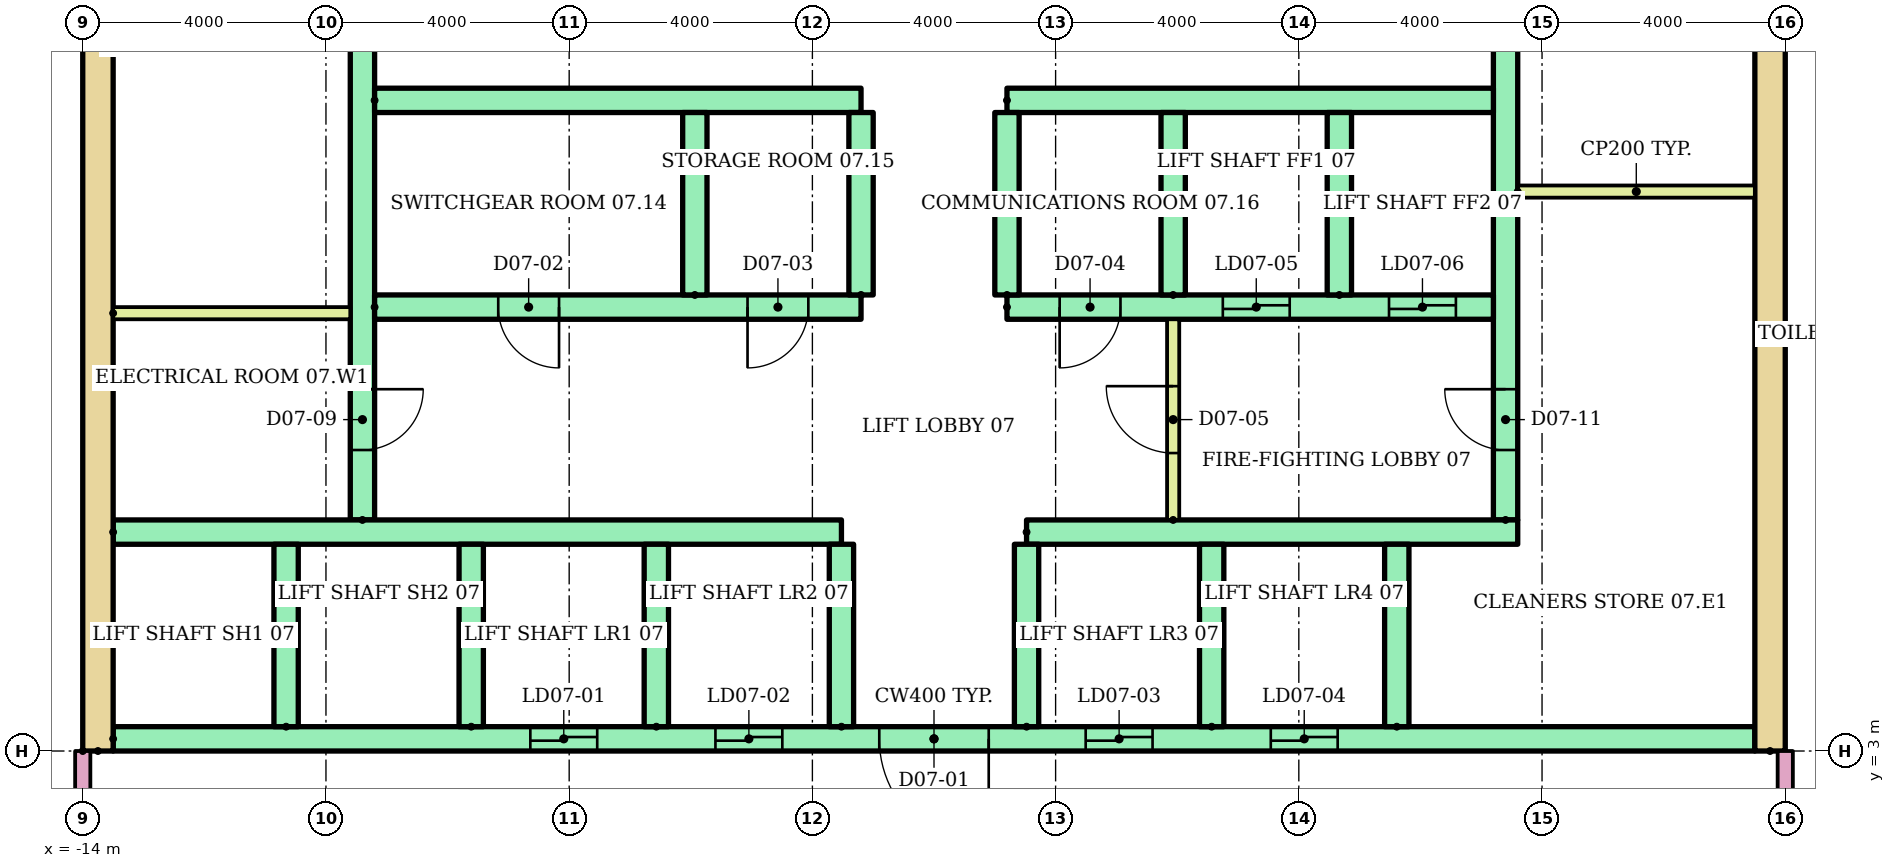
"""IFC4 building model, lengths in metres.
Left out: names, types, materials, properties, quantities, classifications, styles, units other than length and angle.
Written with IfcOpenShell. Run it as: python <this file> out.ifc"""

import sys

from ifc_helpers import new_model, si_unit, direction, frame, frame_2d, origin, place, context, subcontext, project, spatial, rectangle, extrude, element, fill, save


model = new_model("IFC4")
c1 = context("Model", 3, precision=1e-05, world=origin(), true_north=direction((0.0, 1.0)))
c2 = subcontext(c1, "Body", "Model", "MODEL_VIEW")
j1 = project(units=[si_unit("LENGTHUNIT", "METRE"), si_unit("PLANEANGLEUNIT", "RADIAN")], contexts=[c1])
p1 = place(None, origin())
s1 = spatial("IfcSite", under=j1, at=p1, CompositionType="ELEMENT")
p2 = place(p1, origin())
s2 = spatial("IfcBuilding", under=s1, at=p2, CompositionType="ELEMENT")
p3 = place(p2, frame((0.0, 0.0, 29.9)))
s3 = spatial("IfcBuildingStorey", under=s2, at=p3, CompositionType="ELEMENT", Elevation=29.9)
for number, where, z_axis, x_axis in (
    (1, (-13.75, 3.0, 0.0), (0.0, 0.0, 1.0), (0.0, 1.0, 0.0)),
    (2, (13.75, 3.0, 0.0), (0.0, 0.0, 1.0), (0.0, 1.0, 0.0)),
):
    element("IfcWall", number, at=place(p3, frame(where, z_axis=z_axis, x_axis=x_axis)), inside=s3, PredefinedType="SHEAR", context=c2, shape_type="SweptSolid", body=[
        extrude(rectangle(XDim=17.0, YDim=0.5, at=frame_2d((8.5, 0.0))), origin(), (0.0, 0.0, 1.0), 3.6),
    ])
p4 = place(p3, frame((-9.4, 6.8, 0.0), z_axis=(0.0, 0.0, 1.0), x_axis=(0.0, 1.0, 0.0)))
e3 = element("IfcWall", 3, at=p4, inside=s3, PredefinedType="SHEAR", context=c2, shape_type="SweptSolid", body=[
    extrude(rectangle(XDim=12.7, YDim=0.4, at=frame_2d((6.35, 0.0))), origin(), (0.0, 0.0, 1.0), 3.6),
])
p5 = place(p4, frame((1.15, 0.0, 0.0)))
e4 = element("IfcOpeningElement", 4, at=p5, cuts=e3, PredefinedType="OPENING", context=c2, shape_type="SweptSolid", body=[
    extrude(rectangle(XDim=1.0, YDim=2.1, at=frame_2d((0.5, 1.05))), frame((0.0, 0.21, 0.0), z_axis=(0.0, -1.0, 0.0), x_axis=(1.0, 0.0, 0.0)), (0.0, 0.0, 1.0), 0.42),
])
p6 = place(p4, frame((7.925, 0.0, 0.0)))
e5 = element("IfcOpeningElement", 5, at=p6, cuts=e3, PredefinedType="OPENING", context=c2, shape_type="SweptSolid", body=[
    extrude(rectangle(XDim=1.0, YDim=2.1, at=frame_2d((0.5, 1.05))), frame((0.0, 0.21, 0.0), z_axis=(0.0, -1.0, 0.0), x_axis=(1.0, 0.0, 0.0)), (0.0, 0.0, 1.0), 0.42),
])
p7 = place(p3, frame((9.4, 6.8, 0.0), z_axis=(0.0, 0.0, 1.0), x_axis=(0.0, 1.0, 0.0)))
e6 = element("IfcWall", 6, at=p7, inside=s3, PredefinedType="SHEAR", context=c2, shape_type="SweptSolid", body=[
    extrude(rectangle(XDim=12.7, YDim=0.4, at=frame_2d((6.35, 0.0))), origin(), (0.0, 0.0, 1.0), 3.6),
])
p8 = place(p7, frame((1.15, 0.0, 0.0)))
e7 = element("IfcOpeningElement", 7, at=p8, cuts=e6, PredefinedType="OPENING", context=c2, shape_type="SweptSolid", body=[
    extrude(rectangle(XDim=1.0, YDim=2.1, at=frame_2d((0.5, 1.05))), frame((0.0, 0.21, 0.0), z_axis=(0.0, -1.0, 0.0), x_axis=(1.0, 0.0, 0.0)), (0.0, 0.0, 1.0), 0.42),
])
p9 = place(p7, frame((7.925, 0.0, 0.0)))
e8 = element("IfcOpeningElement", 8, at=p9, cuts=e6, PredefinedType="OPENING", context=c2, shape_type="SweptSolid", body=[
    extrude(rectangle(XDim=1.0, YDim=2.1, at=frame_2d((0.5, 1.05))), frame((0.0, 0.21, 0.0), z_axis=(0.0, -1.0, 0.0), x_axis=(1.0, 0.0, 0.0)), (0.0, 0.0, 1.0), 0.42),
])
p10 = place(p3, frame((-13.5, 3.2, 0.0)))
e9 = element("IfcWall", 9, at=p10, inside=s3, PredefinedType="SHEAR", context=c2, shape_type="SweptSolid", body=[
    extrude(rectangle(XDim=27.0, YDim=0.4, at=frame_2d((13.5, 0.0))), origin(), (0.0, 0.0, 1.0), 3.6),
])
p11 = place(p10, frame((6.861, 0.0, 0.0)))
e10 = element("IfcOpeningElement", 10, at=p11, cuts=e9, PredefinedType="OPENING", context=c2, shape_type="SweptSolid", body=[
    extrude(rectangle(XDim=1.1, YDim=2.1, at=frame_2d((0.55, 1.05))), frame((0.0, 0.21, 0.0), z_axis=(0.0, -1.0, 0.0), x_axis=(1.0, 0.0, 0.0)), (0.0, 0.0, 1.0), 0.42),
])
p12 = place(p10, frame((9.906, 0.0, 0.0)))
e11 = element("IfcOpeningElement", 11, at=p12, cuts=e9, PredefinedType="OPENING", context=c2, shape_type="SweptSolid", body=[
    extrude(rectangle(XDim=1.1, YDim=2.1, at=frame_2d((0.55, 1.05))), frame((0.0, 0.21, 0.0), z_axis=(0.0, -1.0, 0.0), x_axis=(1.0, 0.0, 0.0)), (0.0, 0.0, 1.0), 0.42),
])
p13 = place(p10, frame((15.994, 0.0, 0.0)))
e12 = element("IfcOpeningElement", 12, at=p13, cuts=e9, PredefinedType="OPENING", context=c2, shape_type="SweptSolid", body=[
    extrude(rectangle(XDim=1.1, YDim=2.1, at=frame_2d((0.55, 1.05))), frame((0.0, 0.21, 0.0), z_axis=(0.0, -1.0, 0.0), x_axis=(1.0, 0.0, 0.0)), (0.0, 0.0, 1.0), 0.42),
])
p14 = place(p10, frame((19.039, 0.0, 0.0)))
e13 = element("IfcOpeningElement", 13, at=p14, cuts=e9, PredefinedType="OPENING", context=c2, shape_type="SweptSolid", body=[
    extrude(rectangle(XDim=1.1, YDim=2.1, at=frame_2d((0.55, 1.05))), frame((0.0, 0.21, 0.0), z_axis=(0.0, -1.0, 0.0), x_axis=(1.0, 0.0, 0.0)), (0.0, 0.0, 1.0), 0.42),
])
p15 = place(p10, frame((12.6, 0.0, 0.0)))
e14 = element("IfcOpeningElement", 14, at=p15, cuts=e9, PredefinedType="OPENING", context=c2, shape_type="SweptSolid", body=[
    extrude(rectangle(XDim=1.8, YDim=2.1, at=frame_2d((0.9, 1.05))), frame((0.0, 0.21, 0.0), z_axis=(0.0, -1.0, 0.0), x_axis=(1.0, 0.0, 0.0)), (0.0, 0.0, 1.0), 0.42),
])
p16 = place(p3, frame((-13.5, 6.6, 0.0)))
e15 = element("IfcWall", 15, at=p16, inside=s3, PredefinedType="SHEAR", context=c2, shape_type="SweptSolid", body=[
    extrude(rectangle(XDim=11.978, YDim=0.4, at=frame_2d((5.989, 0.0))), origin(), (0.0, 0.0, 1.0), 3.6),
])
p17 = place(p3, frame((1.522, 6.6, 0.0)))
e16 = element("IfcWall", 16, at=p17, inside=s3, PredefinedType="SHEAR", context=c2, shape_type="SweptSolid", body=[
    extrude(rectangle(XDim=8.078, YDim=0.4, at=frame_2d((4.039, 0.0))), origin(), (0.0, 0.0, 1.0), 3.6),
])
for number, where, z_axis, x_axis in (
    (17, (-10.656, 3.4, 0.0), (0.0, 0.0, 1.0), (0.0, 1.0, 0.0)),
    (18, (-7.611, 3.4, 0.0), (0.0, 0.0, 1.0), (0.0, 1.0, 0.0)),
    (19, (-4.567, 3.4, 0.0), (0.0, 0.0, 1.0), (0.0, 1.0, 0.0)),
    (20, (-1.522, 3.4, 0.0), (0.0, 0.0, 1.0), (0.0, 1.0, 0.0)),
    (21, (1.522, 3.4, 0.0), (0.0, 0.0, 1.0), (0.0, 1.0, 0.0)),
    (22, (4.567, 3.4, 0.0), (0.0, 0.0, 1.0), (0.0, 1.0, 0.0)),
    (23, (7.611, 3.4, 0.0), (0.0, 0.0, 1.0), (0.0, 1.0, 0.0)),
):
    element("IfcWall", number, at=place(p3, frame(where, z_axis=z_axis, x_axis=x_axis)), inside=s3, PredefinedType="SHEAR", context=c2, shape_type="SweptSolid", body=[
        extrude(rectangle(XDim=3.0, YDim=0.4, at=frame_2d((1.5, 0.0))), origin(), (0.0, 0.0, 1.0), 3.6),
    ])
p18 = place(p3, frame((-9.2, 10.3, 0.0)))
e24 = element("IfcWall", 24, at=p18, inside=s3, PredefinedType="SHEAR", context=c2, shape_type="SweptSolid", body=[
    extrude(rectangle(XDim=8.0, YDim=0.4, at=frame_2d((4.0, 0.0))), origin(), (0.0, 0.0, 1.0), 3.6),
])
p19 = place(p18, frame((2.033, 0.0, 0.0)))
e25 = element("IfcOpeningElement", 25, at=p19, cuts=e24, PredefinedType="OPENING", context=c2, shape_type="SweptSolid", body=[
    extrude(rectangle(XDim=1.0, YDim=2.1, at=frame_2d((0.5, 1.05))), frame((0.0, 0.21, 0.0), z_axis=(0.0, -1.0, 0.0), x_axis=(1.0, 0.0, 0.0)), (0.0, 0.0, 1.0), 0.42),
])
p20 = place(p18, frame((6.133, 0.0, 0.0)))
e26 = element("IfcOpeningElement", 26, at=p20, cuts=e24, PredefinedType="OPENING", context=c2, shape_type="SweptSolid", body=[
    extrude(rectangle(XDim=1.0, YDim=2.1, at=frame_2d((0.5, 1.05))), frame((0.0, 0.21, 0.0), z_axis=(0.0, -1.0, 0.0), x_axis=(1.0, 0.0, 0.0)), (0.0, 0.0, 1.0), 0.42),
])
p21 = place(p3, frame((-9.2, 13.7, 0.0)))
e27 = element("IfcWall", 27, at=p21, inside=s3, PredefinedType="SHEAR", context=c2, shape_type="SweptSolid", body=[
    extrude(rectangle(XDim=8.0, YDim=0.4, at=frame_2d((4.0, 0.0))), origin(), (0.0, 0.0, 1.0), 3.6),
])
p22 = place(p3, frame((1.2, 10.3, 0.0)))
e28 = element("IfcWall", 28, at=p22, inside=s3, PredefinedType="SHEAR", context=c2, shape_type="SweptSolid", body=[
    extrude(rectangle(XDim=8.0, YDim=0.4, at=frame_2d((4.0, 0.0))), origin(), (0.0, 0.0, 1.0), 3.6),
])
p23 = place(p22, frame((3.55, 0.0, 0.0)))
e29 = element("IfcOpeningElement", 29, at=p23, cuts=e28, PredefinedType="OPENING", context=c2, shape_type="SweptSolid", body=[
    extrude(rectangle(XDim=1.1, YDim=2.1, at=frame_2d((0.55, 1.05))), frame((0.0, 0.21, 0.0), z_axis=(0.0, -1.0, 0.0), x_axis=(1.0, 0.0, 0.0)), (0.0, 0.0, 1.0), 0.42),
])
p24 = place(p22, frame((6.283, 0.0, 0.0)))
e30 = element("IfcOpeningElement", 30, at=p24, cuts=e28, PredefinedType="OPENING", context=c2, shape_type="SweptSolid", body=[
    extrude(rectangle(XDim=1.1, YDim=2.1, at=frame_2d((0.55, 1.05))), frame((0.0, 0.21, 0.0), z_axis=(0.0, -1.0, 0.0), x_axis=(1.0, 0.0, 0.0)), (0.0, 0.0, 1.0), 0.42),
])
p25 = place(p22, frame((0.867, 0.0, 0.0)))
e31 = element("IfcOpeningElement", 31, at=p25, cuts=e28, PredefinedType="OPENING", context=c2, shape_type="SweptSolid", body=[
    extrude(rectangle(XDim=1.0, YDim=2.1, at=frame_2d((0.5, 1.05))), frame((0.0, 0.21, 0.0), z_axis=(0.0, -1.0, 0.0), x_axis=(1.0, 0.0, 0.0)), (0.0, 0.0, 1.0), 0.42),
])
p26 = place(p3, frame((1.2, 13.7, 0.0)))
e32 = element("IfcWall", 32, at=p26, inside=s3, PredefinedType="SHEAR", context=c2, shape_type="SweptSolid", body=[
    extrude(rectangle(XDim=8.0, YDim=0.4, at=frame_2d((4.0, 0.0))), origin(), (0.0, 0.0, 1.0), 3.6),
])
for number, where, z_axis, x_axis in (
    (33, (-3.933, 10.5, 0.0), (0.0, 0.0, 1.0), (0.0, 1.0, 0.0)),
    (34, (-1.2, 10.5, 0.0), (0.0, 0.0, 1.0), (0.0, 1.0, 0.0)),
    (35, (1.2, 10.5, 0.0), (0.0, 0.0, 1.0), (0.0, 1.0, 0.0)),
    (36, (3.933, 10.5, 0.0), (0.0, 0.0, 1.0), (0.0, 1.0, 0.0)),
    (37, (6.667, 10.5, 0.0), (0.0, 0.0, 1.0), (0.0, 1.0, 0.0)),
):
    element("IfcWall", number, at=place(p3, frame(where, z_axis=z_axis, x_axis=x_axis)), inside=s3, PredefinedType="SHEAR", context=c2, shape_type="SweptSolid", body=[
        extrude(rectangle(XDim=3.0, YDim=0.4, at=frame_2d((1.5, 0.0))), origin(), (0.0, 0.0, 1.0), 3.6),
    ])
p27 = place(p3, frame((3.933, 6.8, 0.0), z_axis=(0.0, 0.0, 1.0), x_axis=(0.0, 1.0, 0.0)))
e38 = element("IfcWall", 38, at=p27, inside=s3, PredefinedType="PARTITIONING", context=c2, shape_type="SweptSolid", body=[
    extrude(rectangle(XDim=3.3, YDim=0.2, at=frame_2d((1.65, 0.0))), origin(), (0.0, 0.0, 1.0), 3.6),
])
p28 = place(p27, frame((1.1, 0.0, 0.0)))
e39 = element("IfcOpeningElement", 39, at=p28, cuts=e38, PredefinedType="OPENING", context=c2, shape_type="SweptSolid", body=[
    extrude(rectangle(XDim=1.1, YDim=2.1, at=frame_2d((0.55, 1.05))), frame((0.0, 0.11, 0.0), z_axis=(0.0, -1.0, 0.0), x_axis=(1.0, 0.0, 0.0)), (0.0, 0.0, 1.0), 0.22),
])
for number, where in (
    (40, (-13.5, 10.2, 0.0)),
    (41, (9.6, 12.2, 0.0)),
):
    element("IfcWall", number, at=place(p3, frame(where)), inside=s3, PredefinedType="PARTITIONING", context=c2, shape_type="SweptSolid", body=[
        extrude(rectangle(XDim=3.9, YDim=0.2, at=frame_2d((1.95, 0.0))), origin(), (0.0, 0.0, 1.0), 3.6),
    ])
for number, where, z_axis, x_axis in (
    (42, (-14.0, 3.0, 0.0), (0.0, 0.0, 1.0), (0.0, -1.0, 0.0)),
    (43, (14.0, 1.4, 0.0), (0.0, 0.0, 1.0), (0.0, 1.0, 0.0)),
):
    element("IfcWall", number, at=place(p3, frame(where, z_axis=z_axis, x_axis=x_axis)), inside=s3, PredefinedType="PARTITIONING", context=c2, shape_type="SweptSolid", body=[
        extrude(rectangle(XDim=1.6, YDim=0.25, at=frame_2d((0.8, 0.0))), origin(), (0.0, 0.0, 1.0), 3.1),
    ])
p29 = place(p11, origin())
e44 = element("IfcDoor", 44, at=p29, inside=s3, OperationType="SLIDING_TO_LEFT", PredefinedType="DOOR", context=c2, shape_type="SweptSolid", body=[
    extrude(rectangle(XDim=1.1, YDim=2.1, at=frame_2d((0.55, 1.05))), frame((0.0, 0.025, 0.0), z_axis=(0.0, -1.0, 0.0), x_axis=(1.0, 0.0, 0.0)), (0.0, 0.0, 1.0), 0.05),
])
fill(e10, e44)
p30 = place(p12, origin())
e45 = element("IfcDoor", 45, at=p30, inside=s3, OperationType="SLIDING_TO_LEFT", PredefinedType="DOOR", context=c2, shape_type="SweptSolid", body=[
    extrude(rectangle(XDim=1.1, YDim=2.1, at=frame_2d((0.55, 1.05))), frame((0.0, 0.025, 0.0), z_axis=(0.0, -1.0, 0.0), x_axis=(1.0, 0.0, 0.0)), (0.0, 0.0, 1.0), 0.05),
])
fill(e11, e45)
p31 = place(p13, origin())
e46 = element("IfcDoor", 46, at=p31, inside=s3, OperationType="SLIDING_TO_LEFT", PredefinedType="DOOR", context=c2, shape_type="SweptSolid", body=[
    extrude(rectangle(XDim=1.1, YDim=2.1, at=frame_2d((0.55, 1.05))), frame((0.0, 0.025, 0.0), z_axis=(0.0, -1.0, 0.0), x_axis=(1.0, 0.0, 0.0)), (0.0, 0.0, 1.0), 0.05),
])
fill(e12, e46)
p32 = place(p14, origin())
e47 = element("IfcDoor", 47, at=p32, inside=s3, OperationType="SLIDING_TO_LEFT", PredefinedType="DOOR", context=c2, shape_type="SweptSolid", body=[
    extrude(rectangle(XDim=1.1, YDim=2.1, at=frame_2d((0.55, 1.05))), frame((0.0, 0.025, 0.0), z_axis=(0.0, -1.0, 0.0), x_axis=(1.0, 0.0, 0.0)), (0.0, 0.0, 1.0), 0.05),
])
fill(e13, e47)
p33 = place(p15, frame((1.8, 0.0, 0.0), z_axis=(0.0, 0.0, 1.0), x_axis=(-1.0, 0.0, 0.0)))
e48 = element("IfcDoor", 48, at=p33, inside=s3, OperationType="DOUBLE_DOOR_SINGLE_SWING", PredefinedType="DOOR", context=c2, shape_type="SweptSolid", body=[
    extrude(rectangle(XDim=1.8, YDim=2.1, at=frame_2d((0.9, 1.05))), frame((0.0, 0.025, 0.0), z_axis=(0.0, -1.0, 0.0), x_axis=(1.0, 0.0, 0.0)), (0.0, 0.0, 1.0), 0.05),
])
fill(e14, e48)
p34 = place(p23, origin())
e49 = element("IfcDoor", 49, at=p34, inside=s3, OperationType="SLIDING_TO_LEFT", PredefinedType="DOOR", context=c2, shape_type="SweptSolid", body=[
    extrude(rectangle(XDim=1.1, YDim=2.1, at=frame_2d((0.55, 1.05))), frame((0.0, 0.025, 0.0), z_axis=(0.0, -1.0, 0.0), x_axis=(1.0, 0.0, 0.0)), (0.0, 0.0, 1.0), 0.05),
])
fill(e29, e49)
p35 = place(p24, origin())
e50 = element("IfcDoor", 50, at=p35, inside=s3, OperationType="SLIDING_TO_LEFT", PredefinedType="DOOR", context=c2, shape_type="SweptSolid", body=[
    extrude(rectangle(XDim=1.1, YDim=2.1, at=frame_2d((0.55, 1.05))), frame((0.0, 0.025, 0.0), z_axis=(0.0, -1.0, 0.0), x_axis=(1.0, 0.0, 0.0)), (0.0, 0.0, 1.0), 0.05),
])
fill(e30, e50)
p36 = place(p19, frame((1.0, 0.0, 0.0), z_axis=(0.0, 0.0, 1.0), x_axis=(-1.0, 0.0, 0.0)))
e51 = element("IfcDoor", 51, at=p36, inside=s3, OperationType="SINGLE_SWING_RIGHT", PredefinedType="DOOR", context=c2, shape_type="SweptSolid", body=[
    extrude(rectangle(XDim=1.0, YDim=2.1, at=frame_2d((0.5, 1.05))), frame((0.0, 0.025, 0.0), z_axis=(0.0, -1.0, 0.0), x_axis=(1.0, 0.0, 0.0)), (0.0, 0.0, 1.0), 0.05),
])
fill(e25, e51)
p37 = place(p20, frame((1.0, 0.0, 0.0), z_axis=(0.0, 0.0, 1.0), x_axis=(-1.0, 0.0, 0.0)))
e52 = element("IfcDoor", 52, at=p37, inside=s3, OperationType="SINGLE_SWING_LEFT", PredefinedType="DOOR", context=c2, shape_type="SweptSolid", body=[
    extrude(rectangle(XDim=1.0, YDim=2.1, at=frame_2d((0.5, 1.05))), frame((0.0, 0.025, 0.0), z_axis=(0.0, -1.0, 0.0), x_axis=(1.0, 0.0, 0.0)), (0.0, 0.0, 1.0), 0.05),
])
fill(e26, e52)
p38 = place(p25, frame((1.0, 0.0, 0.0), z_axis=(0.0, 0.0, 1.0), x_axis=(-1.0, 0.0, 0.0)))
e53 = element("IfcDoor", 53, at=p38, inside=s3, OperationType="SINGLE_SWING_LEFT", PredefinedType="DOOR", context=c2, shape_type="SweptSolid", body=[
    extrude(rectangle(XDim=1.0, YDim=2.1, at=frame_2d((0.5, 1.05))), frame((0.0, 0.025, 0.0), z_axis=(0.0, -1.0, 0.0), x_axis=(1.0, 0.0, 0.0)), (0.0, 0.0, 1.0), 0.05),
])
fill(e31, e53)
p39 = place(p28, origin())
e54 = element("IfcDoor", 54, at=p39, inside=s3, OperationType="SINGLE_SWING_RIGHT", PredefinedType="DOOR", context=c2, shape_type="SweptSolid", body=[
    extrude(rectangle(XDim=1.1, YDim=2.1, at=frame_2d((0.55, 1.05))), frame((0.0, 0.025, 0.0), z_axis=(0.0, -1.0, 0.0), x_axis=(1.0, 0.0, 0.0)), (0.0, 0.0, 1.0), 0.05),
])
fill(e39, e54)
p40 = place(p5, frame((1.0, 0.0, 0.0), z_axis=(0.0, 0.0, 1.0), x_axis=(-1.0, 0.0, 0.0)))
e55 = element("IfcDoor", 55, at=p40, inside=s3, OperationType="SINGLE_SWING_RIGHT", PredefinedType="DOOR", context=c2, shape_type="SweptSolid", body=[
    extrude(rectangle(XDim=1.0, YDim=2.1, at=frame_2d((0.5, 1.05))), frame((0.0, 0.025, 0.0), z_axis=(0.0, -1.0, 0.0), x_axis=(1.0, 0.0, 0.0)), (0.0, 0.0, 1.0), 0.05),
])
fill(e4, e55)
p41 = place(p8, origin())
e56 = element("IfcDoor", 56, at=p41, inside=s3, OperationType="SINGLE_SWING_RIGHT", PredefinedType="DOOR", context=c2, shape_type="SweptSolid", body=[
    extrude(rectangle(XDim=1.0, YDim=2.1, at=frame_2d((0.5, 1.05))), frame((0.0, 0.025, 0.0), z_axis=(0.0, -1.0, 0.0), x_axis=(1.0, 0.0, 0.0)), (0.0, 0.0, 1.0), 0.05),
])
fill(e7, e56)
save(model, sys.argv[1])
